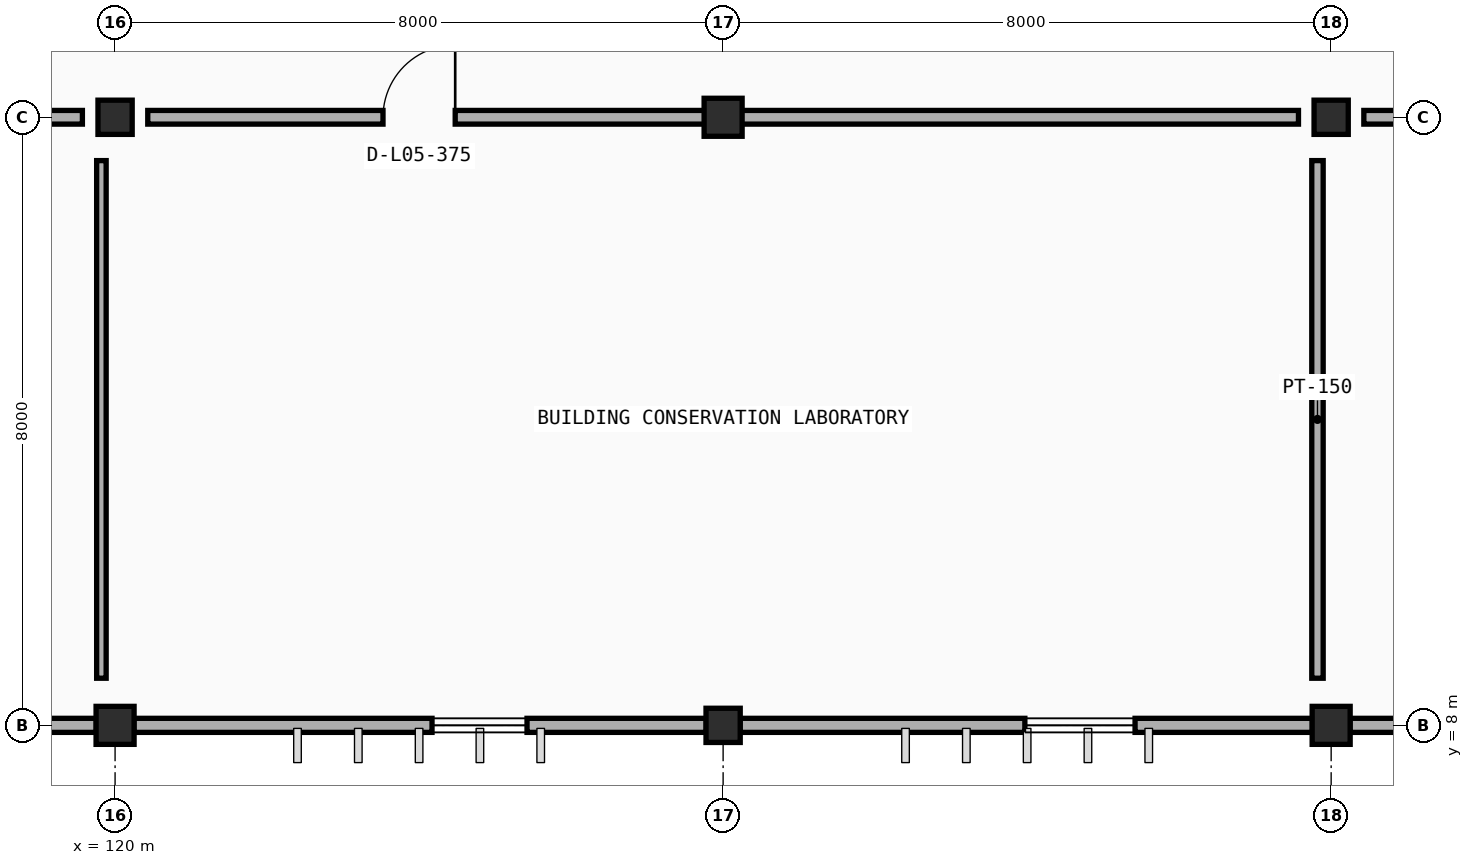
"""IFC4 building model, lengths in metres.
Left out: names, types, materials, properties, quantities, classifications, styles, units other than length and angle.
Written with IfcOpenShell. Run it as: python <this file> out.ifc"""

import sys

from ifc_helpers import new_model, si_unit, direction, frame, frame_2d, origin, origin_2d, place, context, subcontext, project, spatial, rectangle, extrude, element, fill, save


model = new_model("IFC4")
c1 = context("Model", 3, precision=1e-05, world=origin(), true_north=direction((0.0, 1.0)))
c2 = subcontext(c1, "Body", "Model", "MODEL_VIEW")
j1 = project(units=[si_unit("LENGTHUNIT", "METRE"), si_unit("PLANEANGLEUNIT", "RADIAN")], contexts=[c1])
p1 = place(None, origin())
s1 = spatial("IfcSite", under=j1, at=p1, CompositionType="ELEMENT")
p2 = place(p1, origin())
s2 = spatial("IfcBuilding", under=s1, at=p2, CompositionType="ELEMENT")
p3 = place(p2, frame((0.0, 0.0, 18.0)))
s3 = spatial("IfcBuildingStorey", under=s2, at=p3, CompositionType="ELEMENT", Elevation=18.0)
p4 = place(p3, frame((120.0, 8.0, 0.0), z_axis=(0.0, 0.0, 1.0), x_axis=(1.0, 0.0, 0.0)))
e1 = element("IfcColumn", 1, at=p4, inside=s3, PredefinedType="COLUMN", context=c2, shape_type="SweptSolid", body=[
    extrude(rectangle(XDim=0.5, YDim=0.5, at=origin_2d()), origin(), (0.0, 0.0, 1.0), 4.2),
])
p5 = place(p3, frame((128.0, 8.0, 0.0), z_axis=(0.0, 0.0, 1.0), x_axis=(1.0, 0.0, 0.0)))
e2 = element("IfcColumn", 2, at=p5, inside=s3, PredefinedType="COLUMN", context=c2, shape_type="SweptSolid", body=[
    extrude(rectangle(XDim=0.45, YDim=0.45, at=origin_2d()), origin(), (0.0, 0.0, 1.0), 4.2),
])
p6 = place(p3, frame((136.0, 8.0, 0.0), z_axis=(0.0, 0.0, 1.0), x_axis=(1.0, 0.0, 0.0)))
e3 = element("IfcColumn", 3, at=p6, inside=s3, PredefinedType="COLUMN", context=c2, shape_type="SweptSolid", body=[
    extrude(rectangle(XDim=0.5, YDim=0.5, at=origin_2d()), origin(), (0.0, 0.0, 1.0), 4.2),
])
p7 = place(p3, frame((120.0, 16.0, 0.0), z_axis=(0.0, 0.0, 1.0), x_axis=(1.0, 0.0, 0.0)))
e4 = element("IfcColumn", 4, at=p7, inside=s3, PredefinedType="COLUMN", context=c2, shape_type="SweptSolid", body=[
    extrude(rectangle(XDim=0.45, YDim=0.45, at=origin_2d()), origin(), (0.0, 0.0, 1.0), 4.2),
])
p8 = place(p3, frame((128.0, 16.0, 0.0), z_axis=(0.0, 0.0, 1.0), x_axis=(1.0, 0.0, 0.0)))
e5 = element("IfcColumn", 5, at=p8, inside=s3, PredefinedType="COLUMN", context=c2, shape_type="SweptSolid", body=[
    extrude(rectangle(XDim=0.5, YDim=0.5, at=origin_2d()), origin(), (0.0, 0.0, 1.0), 4.2),
])
p9 = place(p3, frame((136.0, 16.0, 0.0), z_axis=(0.0, 0.0, 1.0), x_axis=(1.0, 0.0, 0.0)))
e6 = element("IfcColumn", 6, at=p9, inside=s3, PredefinedType="COLUMN", context=c2, shape_type="SweptSolid", body=[
    extrude(rectangle(XDim=0.45, YDim=0.45, at=origin_2d()), origin(), (0.0, 0.0, 1.0), 4.2),
])
p10 = place(p3, frame((119.753, 8.0, 0.0), z_axis=(0.0, 0.0, 1.0), x_axis=(-1.0, 0.0, 0.0)))
e7 = element("IfcWall", 7, at=p10, inside=s3, PredefinedType="STANDARD", context=c2, shape_type="SweptSolid", body=[
    extrude(rectangle(XDim=7.531, YDim=0.185, at=frame_2d((3.766, 0.0))), origin(), (0.0, 0.0, 1.0), 3.335),
])
p11 = place(p10, frame((2.333, 0.0, 0.9)))
e8 = element("IfcOpeningElement", 8, at=p11, cuts=e7, PredefinedType="OPENING", context=c2, shape_type="SweptSolid", body=[
    extrude(rectangle(XDim=1.05, YDim=1.4, at=frame_2d((0.525, 0.7))), frame((0.0, 0.103, 0.0), z_axis=(0.0, -1.0, 0.0), x_axis=(1.0, 0.0, 0.0)), (0.0, 0.0, 1.0), 0.205),
])
p12 = place(p3, frame((127.778, 8.0, 0.0), z_axis=(0.0, 0.0, 1.0), x_axis=(-1.0, 0.0, 0.0)))
e9 = element("IfcWall", 9, at=p12, inside=s3, PredefinedType="STANDARD", context=c2, shape_type="SweptSolid", body=[
    extrude(rectangle(XDim=7.531, YDim=0.185, at=frame_2d((3.766, 0.0))), origin(), (0.0, 0.0, 1.0), 3.335),
])
p13 = place(p12, frame((2.358, 0.0, 0.9)))
e10 = element("IfcOpeningElement", 10, at=p13, cuts=e9, PredefinedType="OPENING", context=c2, shape_type="SweptSolid", body=[
    extrude(rectangle(XDim=1.25, YDim=1.4, at=frame_2d((0.625, 0.7))), frame((0.0, 0.103, 0.0), z_axis=(0.0, -1.0, 0.0), x_axis=(1.0, 0.0, 0.0)), (0.0, 0.0, 1.0), 0.205),
])
p14 = place(p3, frame((135.753, 8.0, 0.0), z_axis=(0.0, 0.0, 1.0), x_axis=(-1.0, 0.0, 0.0)))
e11 = element("IfcWall", 11, at=p14, inside=s3, PredefinedType="STANDARD", context=c2, shape_type="SweptSolid", body=[
    extrude(rectangle(XDim=7.531, YDim=0.185, at=frame_2d((3.766, 0.0))), origin(), (0.0, 0.0, 1.0), 3.335),
])
p15 = place(p14, frame((2.333, 0.0, 0.9)))
e12 = element("IfcOpeningElement", 12, at=p15, cuts=e11, PredefinedType="OPENING", context=c2, shape_type="SweptSolid", body=[
    extrude(rectangle(XDim=1.45, YDim=1.4, at=frame_2d((0.725, 0.7))), frame((0.0, 0.103, 0.0), z_axis=(0.0, -1.0, 0.0), x_axis=(1.0, 0.0, 0.0)), (0.0, 0.0, 1.0), 0.205),
])
p16 = place(p3, frame((143.778, 8.0, 0.0), z_axis=(0.0, 0.0, 1.0), x_axis=(-1.0, 0.0, 0.0)))
e13 = element("IfcWall", 13, at=p16, inside=s3, PredefinedType="STANDARD", context=c2, shape_type="SweptSolid", body=[
    extrude(rectangle(XDim=7.531, YDim=0.185, at=frame_2d((3.766, 0.0))), origin(), (0.0, 0.0, 1.0), 3.335),
])
p17 = place(p16, frame((2.358, 0.0, 0.9)))
e14 = element("IfcOpeningElement", 14, at=p17, cuts=e13, PredefinedType="OPENING", context=c2, shape_type="SweptSolid", body=[
    extrude(rectangle(XDim=1.05, YDim=1.4, at=frame_2d((0.525, 0.7))), frame((0.0, 0.103, 0.0), z_axis=(0.0, -1.0, 0.0), x_axis=(1.0, 0.0, 0.0)), (0.0, 0.0, 1.0), 0.205),
])
p18 = place(p3, frame((104.43, 16.0, 0.0), z_axis=(0.0, 0.0, 1.0), x_axis=(1.0, 0.0, 0.0)))
e15 = element("IfcWall", 15, at=p18, inside=s3, PredefinedType="PARTITIONING", context=c2, shape_type="SweptSolid", body=[
    extrude(rectangle(XDim=15.14, YDim=0.18, at=frame_2d((7.57, 0.0))), origin(), (0.0, 0.0, 1.0), 3.3),
])
p19 = place(p18, frame((3.11, 0.0, 0.0)))
e16 = element("IfcOpeningElement", 16, at=p19, cuts=e15, PredefinedType="OPENING", context=c2, shape_type="SweptSolid", body=[
    extrude(rectangle(XDim=0.92, YDim=2.15, at=frame_2d((0.46, 1.075))), frame((0.0, 0.1, 0.0), z_axis=(0.0, -1.0, 0.0), x_axis=(1.0, 0.0, 0.0)), (0.0, 0.0, 1.0), 0.2),
])
p20 = place(p3, frame((119.82, 8.62, 0.0), z_axis=(0.0, 0.0, 1.0), x_axis=(0.0, 1.0, 0.0)))
e17 = element("IfcWall", 17, at=p20, inside=s3, PredefinedType="PARTITIONING", context=c2, shape_type="SweptSolid", body=[
    extrude(rectangle(XDim=6.81, YDim=0.125, at=frame_2d((3.405, 0.0))), origin(), (0.0, 0.0, 1.0), 3.3),
])
p21 = place(p3, frame((120.43, 16.0, 0.0), z_axis=(0.0, 0.0, 1.0), x_axis=(1.0, 0.0, 0.0)))
e18 = element("IfcWall", 18, at=p21, inside=s3, PredefinedType="PARTITIONING", context=c2, shape_type="SweptSolid", body=[
    extrude(rectangle(XDim=15.14, YDim=0.18, at=frame_2d((7.57, 0.0))), origin(), (0.0, 0.0, 1.0), 3.3),
])
p22 = place(p21, frame((3.095, 0.0, 0.0)))
e19 = element("IfcOpeningElement", 19, at=p22, cuts=e18, PredefinedType="OPENING", context=c2, shape_type="SweptSolid", body=[
    extrude(rectangle(XDim=0.95, YDim=2.1, at=frame_2d((0.475, 1.05))), frame((0.0, 0.1, 0.0), z_axis=(0.0, -1.0, 0.0), x_axis=(1.0, 0.0, 0.0)), (0.0, 0.0, 1.0), 0.2),
])
p23 = place(p3, frame((135.82, 8.62, 0.0), z_axis=(0.0, 0.0, 1.0), x_axis=(0.0, 1.0, 0.0)))
e20 = element("IfcWall", 20, at=p23, inside=s3, PredefinedType="PARTITIONING", context=c2, shape_type="SweptSolid", body=[
    extrude(rectangle(XDim=6.81, YDim=0.15, at=frame_2d((3.405, 0.0))), origin(), (0.0, 0.0, 1.0), 3.3),
])
p24 = place(p3, frame((136.43, 16.0, 0.0), z_axis=(0.0, 0.0, 1.0), x_axis=(1.0, 0.0, 0.0)))
e21 = element("IfcWall", 21, at=p24, inside=s3, PredefinedType="PARTITIONING", context=c2, shape_type="SweptSolid", body=[
    extrude(rectangle(XDim=15.14, YDim=0.18, at=frame_2d((7.57, 0.0))), origin(), (0.0, 0.0, 1.0), 3.3),
])
p25 = place(p24, frame((2.995, 0.0, 0.0)))
e22 = element("IfcOpeningElement", 22, at=p25, cuts=e21, PredefinedType="OPENING", context=c2, shape_type="SweptSolid", body=[
    extrude(rectangle(XDim=1.15, YDim=2.15, at=frame_2d((0.575, 1.075))), frame((0.0, 0.1, 0.0), z_axis=(0.0, -1.0, 0.0), x_axis=(1.0, 0.0, 0.0)), (0.0, 0.0, 1.0), 0.2),
])
p26 = place(p13, origin())
e23 = element("IfcWindow", 23, at=p26, inside=s3, PartitioningType="SINGLE_PANEL", PredefinedType="WINDOW", context=c2, shape_type="SweptSolid", body=[
    extrude(rectangle(XDim=1.25, YDim=1.4, at=frame_2d((0.625, 0.7))), frame((0.0, 0.03, 0.0), z_axis=(0.0, -1.0, 0.0), x_axis=(1.0, 0.0, 0.0)), (0.0, 0.0, 1.0), 0.06),
])
fill(e10, e23)
p27 = place(p15, origin())
e24 = element("IfcWindow", 24, at=p27, inside=s3, PartitioningType="SINGLE_PANEL", PredefinedType="WINDOW", context=c2, shape_type="SweptSolid", body=[
    extrude(rectangle(XDim=1.45, YDim=1.4, at=frame_2d((0.725, 0.7))), frame((0.0, 0.03, 0.0), z_axis=(0.0, -1.0, 0.0), x_axis=(1.0, 0.0, 0.0)), (0.0, 0.0, 1.0), 0.06),
])
fill(e12, e24)
p28 = place(p22, origin())
e25 = element("IfcDoor", 25, at=p28, inside=s3, OperationType="SINGLE_SWING_RIGHT", PredefinedType="DOOR", context=c2, shape_type="SweptSolid", body=[
    extrude(rectangle(XDim=0.95, YDim=2.1, at=frame_2d((0.475, 1.05))), frame((0.0, 0.025, 0.0), z_axis=(0.0, -1.0, 0.0), x_axis=(1.0, 0.0, 0.0)), (0.0, 0.0, 1.0), 0.05),
])
fill(e19, e25)
save(model, sys.argv[1])
